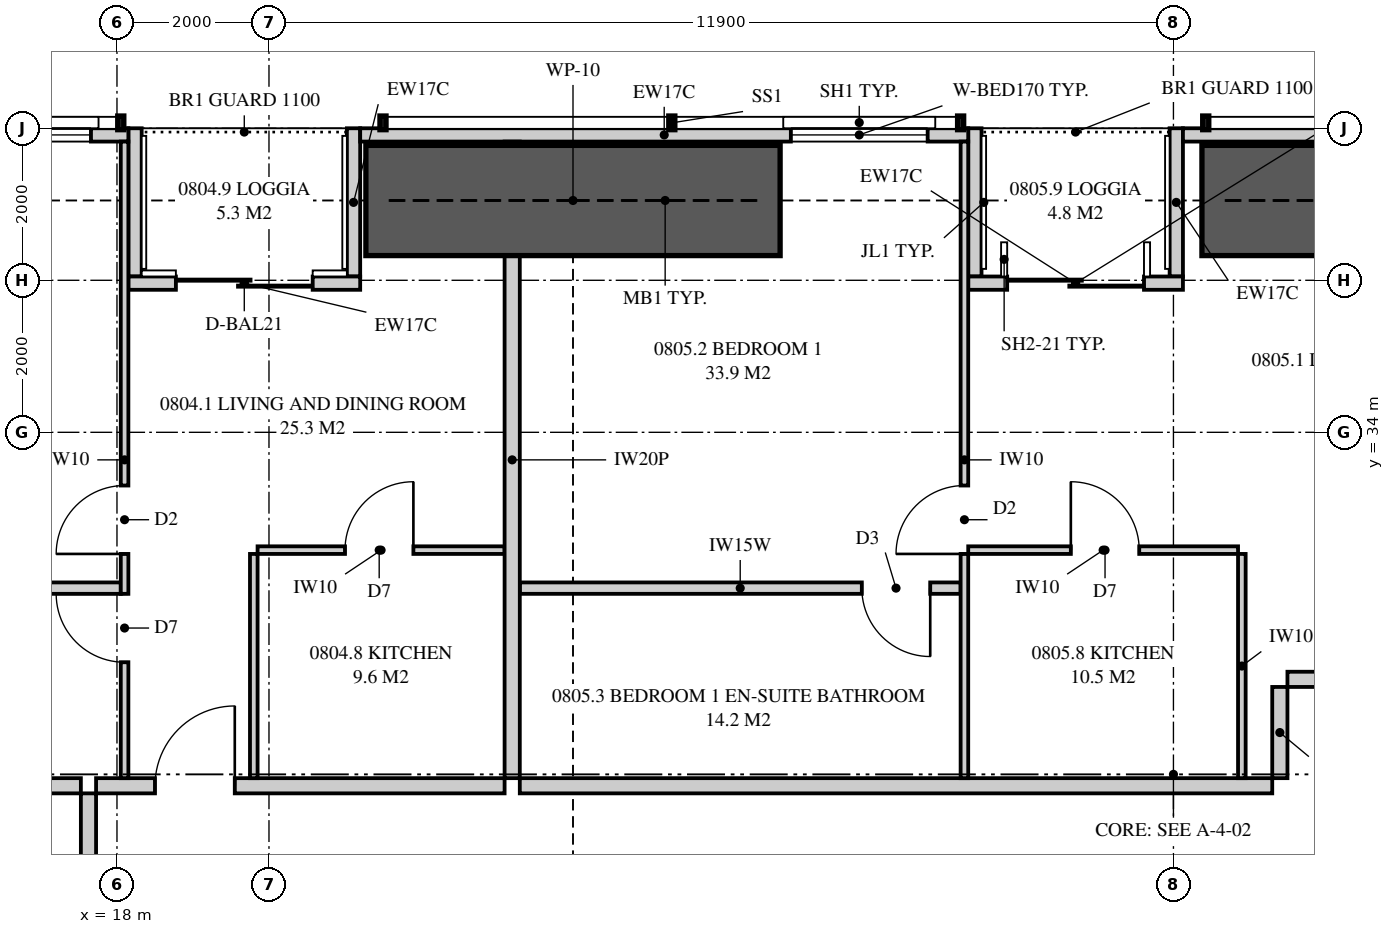
"""IFC4 building model, lengths in metres.
Left out: names, types, materials, properties, quantities, classifications, styles, units other than length and angle.
Written with IfcOpenShell. Run it as: python <this file> out.ifc"""

import sys

from ifc_helpers import new_model, si_unit, direction, frame, frame_2d, origin, place, context, subcontext, project, spatial, polyline, rectangle, outline, extrude, element, fill, save


model = new_model("IFC4")
c1 = context("Model", 3, precision=1e-05, world=origin(), true_north=direction((0.0, 1.0)))
c2 = subcontext(c1, "Body", "Model", "MODEL_VIEW")
j1 = project(units=[si_unit("LENGTHUNIT", "METRE"), si_unit("PLANEANGLEUNIT", "RADIAN")], contexts=[c1])
p1 = place(None, origin())
s1 = spatial("IfcSite", under=j1, at=p1, CompositionType="ELEMENT")
p2 = place(p1, origin())
s2 = spatial("IfcBuilding", under=s1, at=p2, CompositionType="ELEMENT")
p3 = place(p2, frame((0.0, 0.0, 34.4)))
s3 = spatial("IfcBuildingStorey", under=s2, at=p3, CompositionType="ELEMENT", Elevation=34.4)
p4 = place(p3, frame((42.949, 37.913, 0.0), z_axis=(0.0, 0.0, 1.0), x_axis=(-1.0, 0.0, 0.0)))
e1 = element("IfcWall", 1, at=p4, inside=s3, PredefinedType="SOLIDWALL", context=c2, shape_type="SweptSolid", body=[
    extrude(outline(polyline([(0.0, 0.0), (10.924, 0.0), (10.924, 2.15), (7.949, 2.15), (7.949, 3.11), (7.793, 3.11), (7.793, 2.15), (7.745, 2.15), (7.745, 3.11), (0.0, 3.11), (0.0, 0.0)])), frame((0.0, 0.087, 0.0), z_axis=(0.0, -1.0, 0.0), x_axis=(1.0, 0.0, 0.0)), (0.0, 0.0, 1.0), 0.175),
])
p5 = place(p4, frame((2.199, 0.0, 0.4)))
e2 = element("IfcOpeningElement", 2, at=p5, cuts=e1, PredefinedType="OPENING", context=c2, shape_type="SweptSolid", body=[
    extrude(rectangle(XDim=1.8, YDim=1.7, at=frame_2d((0.9, 0.85))), frame((0.0, 0.097, 0.0), z_axis=(0.0, -1.0, 0.0), x_axis=(1.0, 0.0, 0.0)), (0.0, 0.0, 1.0), 0.195),
])
p6 = place(p3, frame((29.2, 37.913, 0.0), z_axis=(0.0, 0.0, 1.0), x_axis=(-1.0, 0.0, 0.0)))
e3 = element("IfcWall", 3, at=p6, inside=s3, PredefinedType="SOLIDWALL", context=c2, shape_type="SweptSolid", body=[
    extrude(rectangle(XDim=8.0, YDim=0.175, at=frame_2d((4.0, 0.0))), origin(), (0.0, 0.0, 1.0), 2.15),
])
p7 = place(p6, frame((0.534, 0.0, 0.4)))
e4 = element("IfcOpeningElement", 4, at=p7, cuts=e3, PredefinedType="OPENING", context=c2, shape_type="SweptSolid", body=[
    extrude(rectangle(XDim=1.8, YDim=1.7, at=frame_2d((0.9, 0.85))), frame((0.0, 0.097, 0.0), z_axis=(0.0, -1.0, 0.0), x_axis=(1.0, 0.0, 0.0)), (0.0, 0.0, 1.0), 0.195),
])
p8 = place(p3, frame((18.15, 37.913, 0.0), z_axis=(0.0, 0.0, 1.0), x_axis=(-1.0, 0.0, 0.0)))
e5 = element("IfcWall", 5, at=p8, inside=s3, PredefinedType="SOLIDWALL", context=c2, shape_type="SweptSolid", body=[
    extrude(outline(polyline([(0.0, 0.0), (13.099, 0.0), (13.099, 3.11), (5.354, 3.11), (5.354, 2.15), (5.306, 2.15), (5.306, 3.11), (5.15, 3.11), (5.15, 2.15), (0.0, 2.15), (0.0, 0.0)])), frame((0.0, 0.087, 0.0), z_axis=(0.0, -1.0, 0.0), x_axis=(1.0, 0.0, 0.0)), (0.0, 0.0, 1.0), 0.175),
])
p9 = place(p8, frame((0.492, 0.0, 0.4)))
e6 = element("IfcOpeningElement", 6, at=p9, cuts=e5, PredefinedType="OPENING", context=c2, shape_type="SweptSolid", body=[
    extrude(rectangle(XDim=1.8, YDim=1.7, at=frame_2d((0.9, 0.85))), frame((0.0, 0.097, 0.0), z_axis=(0.0, -1.0, 0.0), x_axis=(1.0, 0.0, 0.0)), (0.0, 0.0, 1.0), 0.195),
])
p10 = place(p8, frame((7.98, 0.0, 0.4)))
e7 = element("IfcOpeningElement", 7, at=p10, cuts=e5, PredefinedType="OPENING", context=c2, shape_type="SweptSolid", body=[
    extrude(rectangle(XDim=1.8, YDim=1.7, at=frame_2d((0.9, 0.85))), frame((0.0, 0.097, 0.0), z_axis=(0.0, -1.0, 0.0), x_axis=(1.0, 0.0, 0.0)), (0.0, 0.0, 1.0), 0.195),
])
p11 = place(p3, frame((32.025, 35.962, 0.0), z_axis=(0.0, 0.0, 1.0), x_axis=(-1.0, 0.0, 0.0)))
e8 = element("IfcWall", 8, at=p11, inside=s3, PredefinedType="SOLIDWALL", context=c2, shape_type="SweptSolid", body=[
    extrude(rectangle(XDim=2.825, YDim=0.175, at=frame_2d((1.413, 0.0))), origin(), (0.0, 0.0, 1.0), 3.11),
])
p12 = place(p11, frame((0.512, 0.0, 0.0)))
e9 = element("IfcOpeningElement", 9, at=p12, cuts=e8, PredefinedType="OPENING", context=c2, shape_type="SweptSolid", body=[
    extrude(rectangle(XDim=1.8, YDim=2.1, at=frame_2d((0.9, 1.05))), frame((0.0, 0.097, 0.0), z_axis=(0.0, -1.0, 0.0), x_axis=(1.0, 0.0, 0.0)), (0.0, 0.0, 1.0), 0.195),
])
for number, where, z_axis, x_axis in (
    (10, (31.938, 38.0, 0.0), (0.0, 0.0, 1.0), (0.0, -1.0, 0.0)),
    (11, (29.288, 38.0, 0.0), (0.0, 0.0, 1.0), (0.0, -1.0, 0.0)),
):
    element("IfcWall", number, at=place(p3, frame(where, z_axis=z_axis, x_axis=x_axis)), inside=s3, PredefinedType="SOLIDWALL", context=c2, shape_type="SweptSolid", body=[
        extrude(outline(polyline([(0.0, 0.0), (1.95, 0.0), (1.95, 3.11), (1.75, 3.11), (1.75, 2.15), (0.15, 2.15), (0.15, 3.11), (0.0, 3.11), (0.0, 0.0)])), frame((0.0, 0.087, 0.0), z_axis=(0.0, -1.0, 0.0), x_axis=(1.0, 0.0, 0.0)), (0.0, 0.0, 1.0), 0.175),
    ])
p13 = place(p3, frame((21.2, 35.962, 0.0), z_axis=(0.0, 0.0, 1.0), x_axis=(-1.0, 0.0, 0.0)))
e12 = element("IfcWall", 12, at=p13, inside=s3, PredefinedType="SOLIDWALL", context=c2, shape_type="SweptSolid", body=[
    extrude(rectangle(XDim=3.05, YDim=0.175, at=frame_2d((1.525, 0.0))), origin(), (0.0, 0.0, 1.0), 3.11),
])
p14 = place(p13, frame((0.625, 0.0, 0.0)))
e13 = element("IfcOpeningElement", 13, at=p14, cuts=e12, PredefinedType="OPENING", context=c2, shape_type="SweptSolid", body=[
    extrude(rectangle(XDim=1.8, YDim=2.1, at=frame_2d((0.9, 1.05))), frame((0.0, 0.097, 0.0), z_axis=(0.0, -1.0, 0.0), x_axis=(1.0, 0.0, 0.0)), (0.0, 0.0, 1.0), 0.195),
])
for number, where, z_axis, x_axis in (
    (14, (21.113, 38.0, 0.0), (0.0, 0.0, 1.0), (0.0, -1.0, 0.0)),
    (15, (18.238, 38.0, 0.0), (0.0, 0.0, 1.0), (0.0, -1.0, 0.0)),
):
    element("IfcWall", number, at=place(p3, frame(where, z_axis=z_axis, x_axis=x_axis)), inside=s3, PredefinedType="SOLIDWALL", context=c2, shape_type="SweptSolid", body=[
        extrude(outline(polyline([(0.0, 0.0), (1.95, 0.0), (1.95, 3.11), (1.75, 3.11), (1.75, 2.15), (0.15, 2.15), (0.15, 3.11), (0.0, 3.11), (0.0, 0.0)])), frame((0.0, 0.087, 0.0), z_axis=(0.0, -1.0, 0.0), x_axis=(1.0, 0.0, 0.0)), (0.0, 0.0, 1.0), 0.175),
    ])
p15 = place(p3, frame((23.2, 37.825, 0.0), z_axis=(0.0, 0.0, 1.0), x_axis=(0.0, -1.0, 0.0)))
e16 = element("IfcWall", 16, at=p15, inside=s3, PredefinedType="PARTITIONING", context=c2, shape_type="SweptSolid", body=[
    extrude(outline(polyline([(0.529, 2.15), (0.0, 2.15), (0.0, 0.0), (0.529, 0.0), (0.529, 0.954), (1.021, 0.954), (1.021, 0.0), (8.375, 0.0), (8.375, 3.11), (1.685, 3.11), (1.685, 2.15), (1.021, 2.15), (1.021, 1.197), (0.529, 1.197), (0.529, 2.15)])), frame((0.0, 0.1, 0.0), z_axis=(0.0, -1.0, 0.0), x_axis=(1.0, 0.0, 0.0)), (0.0, 0.0, 1.0), 0.2),
])
p16 = place(p3, frame((17.725, 29.35, 0.0), z_axis=(0.0, 0.0, 1.0), x_axis=(1.0, 0.0, 0.0)))
e17 = element("IfcWall", 17, at=p16, inside=s3, PredefinedType="PARTITIONING", context=c2, shape_type="SweptSolid", body=[
    extrude(rectangle(XDim=5.375, YDim=0.2, at=frame_2d((2.688, 0.0))), origin(), (0.0, 0.0, 1.0), 3.11),
])
p17 = place(p16, frame((0.775, 0.0, 0.0)))
e18 = element("IfcOpeningElement", 18, at=p17, cuts=e17, PredefinedType="OPENING", context=c2, shape_type="SweptSolid", body=[
    extrude(rectangle(XDim=1.05, YDim=2.2, at=frame_2d((0.525, 1.1))), frame((0.0, 0.11, 0.0), z_axis=(0.0, -1.0, 0.0), x_axis=(1.0, 0.0, 0.0)), (0.0, 0.0, 1.0), 0.22),
])
p18 = place(p3, frame((18.1, 37.825, 0.0), z_axis=(0.0, 0.0, 1.0), x_axis=(0.0, -1.0, 0.0)))
e19 = element("IfcWall", 19, at=p18, inside=s3, PredefinedType="PARTITIONING", context=c2, shape_type="SweptSolid", body=[
    extrude(outline(polyline([(0.0, 0.0), (8.375, 0.0), (8.375, 3.11), (1.635, 3.11), (1.635, 2.15), (0.0, 2.15), (0.0, 3.11), (0.0, 0.0)])), frame((0.0, 0.05, 0.0), z_axis=(0.0, -1.0, 0.0), x_axis=(1.0, 0.0, 0.0)), (0.0, 0.0, 1.0), 0.1),
])
p19 = place(p18, frame((4.525, 0.0, 0.0)))
e20 = element("IfcOpeningElement", 20, at=p19, cuts=e19, PredefinedType="OPENING", context=c2, shape_type="SweptSolid", body=[
    extrude(rectangle(XDim=0.9, YDim=2.1, at=frame_2d((0.45, 1.05))), frame((0.0, 0.06, 0.0), z_axis=(0.0, -1.0, 0.0), x_axis=(1.0, 0.0, 0.0)), (0.0, 0.0, 1.0), 0.12),
])
p20 = place(p18, frame((5.95, 0.0, 0.0)))
e21 = element("IfcOpeningElement", 21, at=p20, cuts=e19, PredefinedType="OPENING", context=c2, shape_type="SweptSolid", body=[
    extrude(rectangle(XDim=0.9, YDim=2.1, at=frame_2d((0.45, 1.05))), frame((0.0, 0.06, 0.0), z_axis=(0.0, -1.0, 0.0), x_axis=(1.0, 0.0, 0.0)), (0.0, 0.0, 1.0), 0.12),
])
p21 = place(p3, frame((13.85, 31.95, 0.0), z_axis=(0.0, 0.0, 1.0), x_axis=(1.0, 0.0, 0.0)))
e22 = element("IfcWall", 22, at=p21, inside=s3, PredefinedType="PLUMBINGWALL", context=c2, shape_type="SweptSolid", body=[
    extrude(rectangle(XDim=4.2, YDim=0.15, at=frame_2d((2.1, 0.0))), origin(), (0.0, 0.0, 1.0), 3.11),
])
p22 = place(p3, frame((19.85, 32.45, 0.0), z_axis=(0.0, 0.0, 1.0), x_axis=(1.0, 0.0, 0.0)))
e23 = element("IfcWall", 23, at=p22, inside=s3, PredefinedType="PARTITIONING", context=c2, shape_type="SweptSolid", body=[
    extrude(rectangle(XDim=3.25, YDim=0.1, at=frame_2d((1.625, 0.0))), origin(), (0.0, 0.0, 1.0), 3.11),
])
p23 = place(p22, frame((1.15, 0.0, 0.0)))
e24 = element("IfcOpeningElement", 24, at=p23, cuts=e23, PredefinedType="OPENING", context=c2, shape_type="SweptSolid", body=[
    extrude(rectangle(XDim=0.9, YDim=2.1, at=frame_2d((0.45, 1.05))), frame((0.0, 0.06, 0.0), z_axis=(0.0, -1.0, 0.0), x_axis=(1.0, 0.0, 0.0)), (0.0, 0.0, 1.0), 0.12),
])
p24 = place(p3, frame((19.8, 32.4, 0.0), z_axis=(0.0, 0.0, 1.0), x_axis=(0.0, -1.0, 0.0)))
e25 = element("IfcWall", 25, at=p24, inside=s3, PredefinedType="PARTITIONING", context=c2, shape_type="SweptSolid", body=[
    extrude(rectangle(XDim=2.95, YDim=0.1, at=frame_2d((1.475, 0.0))), origin(), (0.0, 0.0, 1.0), 3.11),
])
p25 = place(p3, frame((23.3, 29.35, 0.0), z_axis=(0.0, 0.0, 1.0), x_axis=(1.0, 0.0, 0.0)))
e26 = element("IfcWall", 26, at=p25, inside=s3, PredefinedType="PARTITIONING", context=c2, shape_type="SweptSolid", body=[
    extrude(outline(polyline([(0.0, 0.0), (9.9, 0.0), (9.9, 3.11), (1.037, 3.11), (1.037, 2.541), (0.363, 2.541), (0.363, 3.11), (0.0, 3.11), (0.0, 0.0)])), frame((0.0, 0.1, 0.0), z_axis=(0.0, -1.0, 0.0), x_axis=(1.0, 0.0, 0.0)), (0.0, 0.0, 1.0), 0.2),
])
p26 = place(p3, frame((29.15, 37.825, 0.0), z_axis=(0.0, 0.0, 1.0), x_axis=(0.0, -1.0, 0.0)))
e27 = element("IfcWall", 27, at=p26, inside=s3, PredefinedType="PARTITIONING", context=c2, shape_type="SweptSolid", body=[
    extrude(outline(polyline([(0.0, 0.0), (8.375, 0.0), (8.375, 3.11), (1.635, 3.11), (1.635, 2.15), (0.0, 2.15), (0.0, 3.11), (0.0, 0.0)])), frame((0.0, 0.05, 0.0), z_axis=(0.0, -1.0, 0.0), x_axis=(1.0, 0.0, 0.0)), (0.0, 0.0, 1.0), 0.1),
])
p27 = place(p26, frame((4.525, 0.0, 0.0)))
e28 = element("IfcOpeningElement", 28, at=p27, cuts=e27, PredefinedType="OPENING", context=c2, shape_type="SweptSolid", body=[
    extrude(rectangle(XDim=0.9, YDim=2.1, at=frame_2d((0.45, 1.05))), frame((0.0, 0.06, 0.0), z_axis=(0.0, -1.0, 0.0), x_axis=(1.0, 0.0, 0.0)), (0.0, 0.0, 1.0), 0.12),
])
p28 = place(p3, frame((23.3, 31.95, 0.0), z_axis=(0.0, 0.0, 1.0), x_axis=(1.0, 0.0, 0.0)))
e29 = element("IfcWall", 29, at=p28, inside=s3, PredefinedType="PLUMBINGWALL", context=c2, shape_type="SweptSolid", body=[
    extrude(outline(polyline([(0.0, 0.0), (5.8, 0.0), (5.8, 3.11), (1.012, 3.11), (1.012, 2.541), (0.388, 2.541), (0.388, 3.11), (0.0, 3.11), (0.0, 0.0)])), frame((0.0, 0.075, 0.0), z_axis=(0.0, -1.0, 0.0), x_axis=(1.0, 0.0, 0.0)), (0.0, 0.0, 1.0), 0.15),
])
p29 = place(p28, frame((4.5, 0.0, 0.0)))
e30 = element("IfcOpeningElement", 30, at=p29, cuts=e29, PredefinedType="OPENING", context=c2, shape_type="SweptSolid", body=[
    extrude(rectangle(XDim=0.9, YDim=2.1, at=frame_2d((0.45, 1.05))), frame((0.0, 0.085, 0.0), z_axis=(0.0, -1.0, 0.0), x_axis=(1.0, 0.0, 0.0)), (0.0, 0.0, 1.0), 0.17),
])
p30 = place(p3, frame((29.2, 32.45, 0.0), z_axis=(0.0, 0.0, 1.0), x_axis=(1.0, 0.0, 0.0)))
e31 = element("IfcWall", 31, at=p30, inside=s3, PredefinedType="PARTITIONING", context=c2, shape_type="SweptSolid", body=[
    extrude(rectangle(XDim=3.55, YDim=0.1, at=frame_2d((1.775, 0.0))), origin(), (0.0, 0.0, 1.0), 3.11),
])
p31 = place(p30, frame((1.35, 0.0, 0.0)))
e32 = element("IfcOpeningElement", 32, at=p31, cuts=e31, PredefinedType="OPENING", context=c2, shape_type="SweptSolid", body=[
    extrude(rectangle(XDim=0.9, YDim=2.1, at=frame_2d((0.45, 1.05))), frame((0.0, 0.06, 0.0), z_axis=(0.0, -1.0, 0.0), x_axis=(1.0, 0.0, 0.0)), (0.0, 0.0, 1.0), 0.12),
])
p32 = place(p3, frame((32.8, 32.4, 0.0), z_axis=(0.0, 0.0, 1.0), x_axis=(0.0, -1.0, 0.0)))
e33 = element("IfcWall", 33, at=p32, inside=s3, PredefinedType="PARTITIONING", context=c2, shape_type="SweptSolid", body=[
    extrude(rectangle(XDim=2.95, YDim=0.1, at=frame_2d((1.475, 0.0))), origin(), (0.0, 0.0, 1.0), 3.11),
])
p33 = place(p3, frame((2.0, 29.35, 0.0), z_axis=(0.0, 0.0, 1.0), x_axis=(1.0, 0.0, 0.0)))
e34 = element("IfcWall", 34, at=p33, inside=s3, PredefinedType="PARTITIONING", context=c2, shape_type="SweptSolid", body=[
    extrude(outline(polyline([(0.0, 0.0), (15.525, 0.0), (15.525, 3.11), (11.337, 3.11), (11.337, 2.541), (10.663, 2.541), (10.663, 3.11), (9.51, 3.11), (9.51, 2.51), (6.89, 2.51), (6.89, 3.11), (2.969, 3.11), (2.969, 2.541), (2.577, 2.541), (2.577, 2.15), (0.733, 2.15), (0.733, 3.11), (0.0, 3.11), (0.0, 0.0)])), frame((0.0, 0.1, 0.0), z_axis=(0.0, -1.0, 0.0), x_axis=(1.0, 0.0, 0.0)), (0.0, 0.0, 1.0), 0.2),
])
p34 = place(p3, frame((17.625, 24.1, 0.0), z_axis=(0.0, 0.0, 1.0), x_axis=(0.0, 1.0, 0.0)))
e35 = element("IfcWall", 35, at=p34, inside=s3, PredefinedType="PARTITIONING", context=c2, shape_type="SweptSolid", body=[
    extrude(outline(polyline([(0.0, 0.0), (5.15, 0.0), (5.15, 3.11), (1.237, 3.11), (1.237, 2.541), (0.562, 2.541), (0.562, 3.11), (0.0, 3.11), (0.0, 0.0)])), frame((0.0, 0.1, 0.0), z_axis=(0.0, -1.0, 0.0), x_axis=(1.0, 0.0, 0.0)), (0.0, 0.0, 1.0), 0.2),
])
p35 = place(p34, frame((1.675, 0.0, 0.0)))
e36 = element("IfcOpeningElement", 36, at=p35, cuts=e35, PredefinedType="OPENING", context=c2, shape_type="SweptSolid", body=[
    extrude(rectangle(XDim=1.8, YDim=2.1, at=frame_2d((0.9, 1.05))), frame((0.0, 0.11, 0.0), z_axis=(0.0, -1.0, 0.0), x_axis=(1.0, 0.0, 0.0)), (0.0, 0.0, 1.0), 0.22),
])
p36 = place(p3, frame((33.4, 30.75, 0.0), z_axis=(0.0, 0.0, 1.0), x_axis=(1.0, 0.0, 0.0)))
e37 = element("IfcWall", 37, at=p36, inside=s3, PredefinedType="PARTITIONING", context=c2, shape_type="SweptSolid", body=[
    extrude(outline(polyline([(0.0, 0.0), (2.4, 0.0), (2.4, 3.11), (1.938, 3.11), (1.938, 2.541), (1.263, 2.541), (1.263, 3.11), (0.0, 3.11), (0.0, 0.0)])), frame((0.0, 0.1, 0.0), z_axis=(0.0, -1.0, 0.0), x_axis=(1.0, 0.0, 0.0)), (0.0, 0.0, 1.0), 0.2),
])
p37 = place(p36, frame((0.7, 0.0, 0.0)))
e38 = element("IfcOpeningElement", 38, at=p37, cuts=e37, PredefinedType="OPENING", context=c2, shape_type="SweptSolid", body=[
    extrude(rectangle(XDim=1.05, YDim=2.2, at=frame_2d((0.525, 1.1))), frame((0.0, 0.11, 0.0), z_axis=(0.0, -1.0, 0.0), x_axis=(1.0, 0.0, 0.0)), (0.0, 0.0, 1.0), 0.22),
])
p38 = place(p3, frame((33.3, 29.45, 0.0), z_axis=(0.0, 0.0, 1.0), x_axis=(0.0, 1.0, 0.0)))
e39 = element("IfcWall", 39, at=p38, inside=s3, PredefinedType="PARTITIONING", context=c2, shape_type="SweptSolid", body=[
    extrude(rectangle(XDim=1.2, YDim=0.2, at=frame_2d((0.6, 0.0))), origin(), (0.0, 0.0, 1.0), 3.11),
])
for number, where, z_axis, x_axis in (
    (40, (32.275, 37.05, 0.0), (0.0, 0.0, 1.0), (1.0, 0.0, 0.0)),
    (41, (21.275, 37.05, 0.0), (0.0, 0.0, 1.0), (1.0, 0.0, 0.0)),
):
    element("IfcWall", number, at=place(p3, frame(where, z_axis=z_axis, x_axis=x_axis)), inside=s3, PredefinedType="SHEAR", context=c2, shape_type="SweptSolid", body=[
        extrude(rectangle(XDim=5.45, YDim=1.45, at=frame_2d((2.725, 0.0))), origin(), (0.0, 0.0, 1.0), 3.35),
    ])
p39 = place(p12, origin())
e42 = element("IfcDoor", 42, at=p39, inside=s3, OperationType="SLIDING_TO_LEFT", PredefinedType="DOOR", context=c2, shape_type="SweptSolid", body=[
    extrude(rectangle(XDim=1.8, YDim=2.1, at=frame_2d((0.9, 1.05))), frame((0.0, 0.025, 0.0), z_axis=(0.0, -1.0, 0.0), x_axis=(1.0, 0.0, 0.0)), (0.0, 0.0, 1.0), 0.05),
])
fill(e9, e42)
p40 = place(p7, origin())
e43 = element("IfcWindow", 43, at=p40, inside=s3, PartitioningType="SINGLE_PANEL", PredefinedType="WINDOW", context=c2, shape_type="SweptSolid", body=[
    extrude(rectangle(XDim=1.8, YDim=1.7, at=frame_2d((0.9, 0.85))), frame((0.0, 0.03, 0.0), z_axis=(0.0, -1.0, 0.0), x_axis=(1.0, 0.0, 0.0)), (0.0, 0.0, 1.0), 0.06),
])
fill(e4, e43)
p41 = place(p14, origin())
e44 = element("IfcDoor", 44, at=p41, inside=s3, OperationType="SLIDING_TO_LEFT", PredefinedType="DOOR", context=c2, shape_type="SweptSolid", body=[
    extrude(rectangle(XDim=1.8, YDim=2.1, at=frame_2d((0.9, 1.05))), frame((0.0, 0.025, 0.0), z_axis=(0.0, -1.0, 0.0), x_axis=(1.0, 0.0, 0.0)), (0.0, 0.0, 1.0), 0.05),
])
fill(e13, e44)
p42 = place(p9, origin())
e45 = element("IfcWindow", 45, at=p42, inside=s3, PartitioningType="SINGLE_PANEL", PredefinedType="WINDOW", context=c2, shape_type="SweptSolid", body=[
    extrude(rectangle(XDim=1.8, YDim=1.7, at=frame_2d((0.9, 0.85))), frame((0.0, 0.03, 0.0), z_axis=(0.0, -1.0, 0.0), x_axis=(1.0, 0.0, 0.0)), (0.0, 0.0, 1.0), 0.06),
])
fill(e6, e45)
p43 = place(p17, origin())
e46 = element("IfcDoor", 46, at=p43, inside=s3, OperationType="SINGLE_SWING_RIGHT", PredefinedType="DOOR", context=c2, shape_type="SweptSolid", body=[
    extrude(rectangle(XDim=1.05, YDim=2.2, at=frame_2d((0.525, 1.1))), frame((0.0, 0.025, 0.0), z_axis=(0.0, -1.0, 0.0), x_axis=(1.0, 0.0, 0.0)), (0.0, 0.0, 1.0), 0.05),
])
fill(e18, e46)
p44 = place(p19, frame((0.9, 0.0, 0.0), z_axis=(0.0, 0.0, 1.0), x_axis=(-1.0, 0.0, 0.0)))
e47 = element("IfcDoor", 47, at=p44, inside=s3, OperationType="SINGLE_SWING_LEFT", PredefinedType="DOOR", context=c2, shape_type="SweptSolid", body=[
    extrude(rectangle(XDim=0.9, YDim=2.1, at=frame_2d((0.45, 1.05))), frame((0.0, 0.025, 0.0), z_axis=(0.0, -1.0, 0.0), x_axis=(1.0, 0.0, 0.0)), (0.0, 0.0, 1.0), 0.05),
])
fill(e20, e47)
p45 = place(p20, frame((0.9, 0.0, 0.0), z_axis=(0.0, 0.0, 1.0), x_axis=(-1.0, 0.0, 0.0)))
e48 = element("IfcDoor", 48, at=p45, inside=s3, OperationType="SINGLE_SWING_RIGHT", PredefinedType="DOOR", context=c2, shape_type="SweptSolid", body=[
    extrude(rectangle(XDim=0.9, YDim=2.1, at=frame_2d((0.45, 1.05))), frame((0.0, 0.025, 0.0), z_axis=(0.0, -1.0, 0.0), x_axis=(1.0, 0.0, 0.0)), (0.0, 0.0, 1.0), 0.05),
])
fill(e21, e48)
p46 = place(p23, origin())
e49 = element("IfcDoor", 49, at=p46, inside=s3, OperationType="SINGLE_SWING_RIGHT", PredefinedType="DOOR", context=c2, shape_type="SweptSolid", body=[
    extrude(rectangle(XDim=0.9, YDim=2.1, at=frame_2d((0.45, 1.05))), frame((0.0, 0.025, 0.0), z_axis=(0.0, -1.0, 0.0), x_axis=(1.0, 0.0, 0.0)), (0.0, 0.0, 1.0), 0.05),
])
fill(e24, e49)
p47 = place(p27, frame((0.9, 0.0, 0.0), z_axis=(0.0, 0.0, 1.0), x_axis=(-1.0, 0.0, 0.0)))
e50 = element("IfcDoor", 50, at=p47, inside=s3, OperationType="SINGLE_SWING_LEFT", PredefinedType="DOOR", context=c2, shape_type="SweptSolid", body=[
    extrude(rectangle(XDim=0.9, YDim=2.1, at=frame_2d((0.45, 1.05))), frame((0.0, 0.025, 0.0), z_axis=(0.0, -1.0, 0.0), x_axis=(1.0, 0.0, 0.0)), (0.0, 0.0, 1.0), 0.05),
])
fill(e28, e50)
p48 = place(p29, frame((0.9, 0.0, 0.0), z_axis=(0.0, 0.0, 1.0), x_axis=(-1.0, 0.0, 0.0)))
e51 = element("IfcDoor", 51, at=p48, inside=s3, OperationType="SINGLE_SWING_LEFT", PredefinedType="DOOR", context=c2, shape_type="SweptSolid", body=[
    extrude(rectangle(XDim=0.9, YDim=2.1, at=frame_2d((0.45, 1.05))), frame((0.0, 0.025, 0.0), z_axis=(0.0, -1.0, 0.0), x_axis=(1.0, 0.0, 0.0)), (0.0, 0.0, 1.0), 0.05),
])
fill(e30, e51)
p49 = place(p31, origin())
e52 = element("IfcDoor", 52, at=p49, inside=s3, OperationType="SINGLE_SWING_LEFT", PredefinedType="DOOR", context=c2, shape_type="SweptSolid", body=[
    extrude(rectangle(XDim=0.9, YDim=2.1, at=frame_2d((0.45, 1.05))), frame((0.0, 0.025, 0.0), z_axis=(0.0, -1.0, 0.0), x_axis=(1.0, 0.0, 0.0)), (0.0, 0.0, 1.0), 0.05),
])
fill(e32, e52)
save(model, sys.argv[1])
